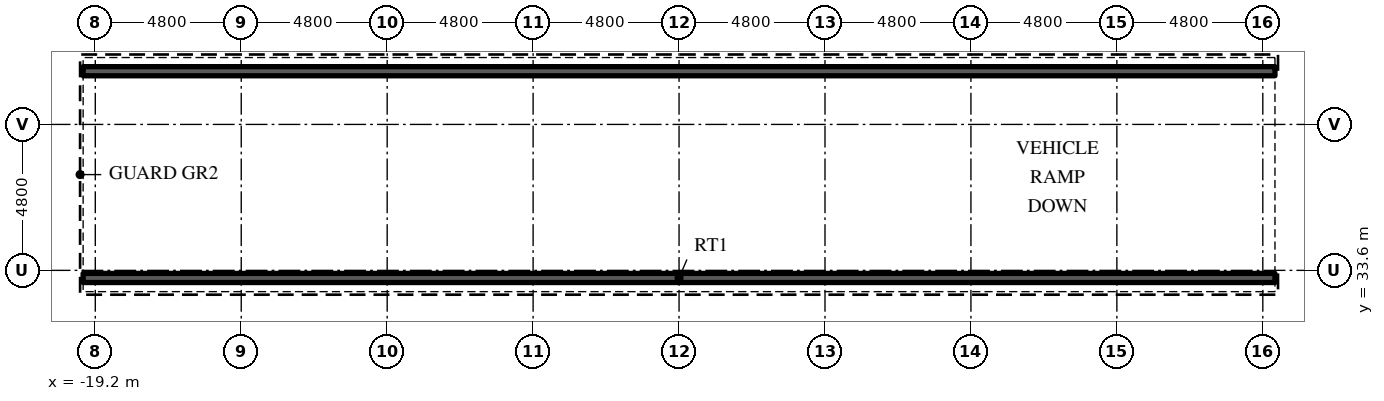
"""IFC4 building model, lengths in metres.
Left out: names, types, materials, properties, quantities, classifications, styles, units other than length and angle.
Written with IfcOpenShell. Run it as: python <this file> out.ifc"""

import sys

from ifc_helpers import new_model, si_unit, direction, frame, frame_2d, origin, place, context, subcontext, project, spatial, rectangle, extrude, element, save


model = new_model("IFC4")
c1 = context("Model", 3, precision=1e-05, world=origin(), true_north=direction((0.0, 1.0)))
c2 = subcontext(c1, "Body", "Model", "MODEL_VIEW")
j1 = project(units=[si_unit("LENGTHUNIT", "METRE"), si_unit("PLANEANGLEUNIT", "RADIAN")], contexts=[c1])
p1 = place(None, origin())
s1 = spatial("IfcSite", under=j1, at=p1, CompositionType="ELEMENT")
p2 = place(p1, origin())
s2 = spatial("IfcBuilding", under=s1, at=p2, CompositionType="ELEMENT")
p3 = place(p2, frame((0.0, 0.0, -4.5)))
s3 = spatial("IfcBuildingStorey", under=s2, at=p3, CompositionType="ELEMENT", Elevation=-4.5)
for number, where, z_axis, x_axis in (
    (1, (-19.6, 33.35, 0.0), (0.0, 0.0, 1.0), (1.0, 0.0, 0.0)),
    (2, (-19.6, 40.15, 0.0), (0.0, 0.0, 1.0), (1.0, 0.0, 0.0)),
):
    element("IfcWall", number, at=place(p3, frame(where, z_axis=z_axis, x_axis=x_axis)), inside=s3, PredefinedType="SOLIDWALL", context=c2, shape_type="SweptSolid", body=[
        extrude(rectangle(XDim=39.2, YDim=0.3, at=frame_2d((19.6, 0.0))), origin(), (0.0, 0.0, 1.0), 4.05),
    ])
save(model, sys.argv[1])
